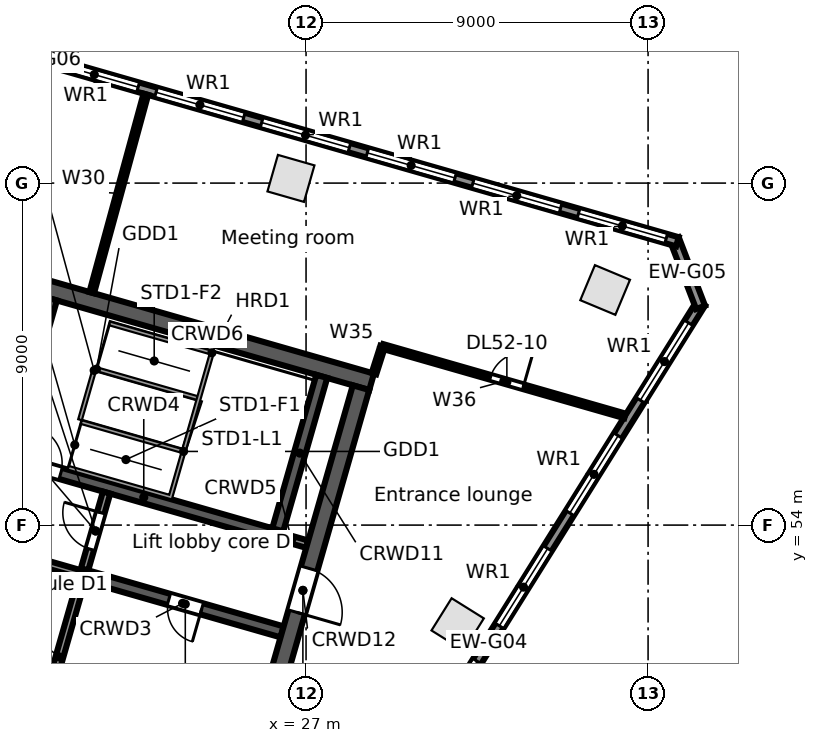
"""IFC4 building model, lengths in metres.
Left out: names, types, materials, properties, quantities, classifications, styles, units other than length and angle.
Written with IfcOpenShell. Run it as: python <this file> out.ifc"""

import sys

from ifc_helpers import new_model, si_unit, direction, frame, frame_2d, origin, origin_2d, place, context, subcontext, project, spatial, rectangle, extrude, element, fill, save


model = new_model("IFC4")
c1 = context("Model", 3, precision=1e-05, world=origin(), true_north=direction((0.0, 1.0)))
c2 = subcontext(c1, "Body", "Model", "MODEL_VIEW")
j1 = project(units=[si_unit("LENGTHUNIT", "METRE"), si_unit("PLANEANGLEUNIT", "RADIAN")], contexts=[c1])
p1 = place(None, origin())
s1 = spatial("IfcSite", under=j1, at=p1, CompositionType="ELEMENT")
p2 = place(p1, origin())
s2 = spatial("IfcBuilding", under=s1, at=p2, CompositionType="ELEMENT")
p3 = place(p2, frame((0.0, 0.0, 238.7)))
s3 = spatial("IfcBuildingStorey", under=s2, at=p3, CompositionType="ELEMENT", Elevation=238.7)
for number, where, z_axis, x_axis in (
    (1, (26.603, 63.124, 0.0), (0.0, 0.0, 1.0), (-0.961, 0.276, 0.0)),
    (2, (30.99, 51.386, 0.0), (0.0, 0.0, 1.0), (0.53, 0.848, 0.0)),
    (3, (34.87, 60.187, 0.0), (0.0, 0.0, 1.0), (-0.923, 0.385, 0.0)),
):
    element("IfcColumn", number, at=place(p3, frame(where, z_axis=z_axis, x_axis=x_axis)), inside=s3, PredefinedType="COLUMN", context=c2, shape_type="SweptSolid", body=[
        extrude(rectangle(XDim=1.0, YDim=1.0, at=origin_2d()), origin(), (0.0, 0.0, 1.0), 3.9),
    ])
p4 = place(p3, frame((37.392, 59.84, 0.0), z_axis=(0.0, 0.0, 1.0), x_axis=(-0.529919909431, -0.848047692992, 0.0)))
e4 = element("IfcWall", 4, at=p4, inside=s3, PredefinedType="STANDARD", context=c2, shape_type="SweptSolid", body=[
    extrude(rectangle(XDim=21.104, YDim=0.25, at=frame_2d((10.552, 0.0))), origin(), (0.0, 0.0, 1.0), 3.62),
])
p5 = place(p4, frame((18.112, 0.0, 0.8)))
e5 = element("IfcOpeningElement", 5, at=p5, cuts=e4, PredefinedType="OPENING", context=c2, shape_type="SweptSolid", body=[
    extrude(rectangle(XDim=2.4, YDim=2.2, at=frame_2d((1.2, 1.1))), frame((0.0, 0.135, 0.0), z_axis=(0.0, -1.0, 0.0), x_axis=(1.0, 0.0, 0.0)), (0.0, 0.0, 1.0), 0.27),
])
p6 = place(p4, frame((14.612, 0.0, 0.8)))
e6 = element("IfcOpeningElement", 6, at=p6, cuts=e4, PredefinedType="OPENING", context=c2, shape_type="SweptSolid", body=[
    extrude(rectangle(XDim=2.4, YDim=2.2, at=frame_2d((1.2, 1.1))), frame((0.0, 0.135, 0.0), z_axis=(0.0, -1.0, 0.0), x_axis=(1.0, 0.0, 0.0)), (0.0, 0.0, 1.0), 0.27),
])
p7 = place(p4, frame((11.112, 0.0, 0.8)))
e7 = element("IfcOpeningElement", 7, at=p7, cuts=e4, PredefinedType="OPENING", context=c2, shape_type="SweptSolid", body=[
    extrude(rectangle(XDim=2.4, YDim=2.2, at=frame_2d((1.2, 1.1))), frame((0.0, 0.135, 0.0), z_axis=(0.0, -1.0, 0.0), x_axis=(1.0, 0.0, 0.0)), (0.0, 0.0, 1.0), 0.27),
])
p8 = place(p4, frame((7.612, 0.0, 0.8)))
e8 = element("IfcOpeningElement", 8, at=p8, cuts=e4, PredefinedType="OPENING", context=c2, shape_type="SweptSolid", body=[
    extrude(rectangle(XDim=2.4, YDim=2.2, at=frame_2d((1.2, 1.1))), frame((0.0, 0.135, 0.0), z_axis=(0.0, -1.0, 0.0), x_axis=(1.0, 0.0, 0.0)), (0.0, 0.0, 1.0), 0.27),
])
p9 = place(p4, frame((4.112, 0.0, 0.8)))
e9 = element("IfcOpeningElement", 9, at=p9, cuts=e4, PredefinedType="OPENING", context=c2, shape_type="SweptSolid", body=[
    extrude(rectangle(XDim=2.4, YDim=2.2, at=frame_2d((1.2, 1.1))), frame((0.0, 0.135, 0.0), z_axis=(0.0, -1.0, 0.0), x_axis=(1.0, 0.0, 0.0)), (0.0, 0.0, 1.0), 0.27),
])
p10 = place(p4, frame((0.612, 0.0, 0.8)))
e10 = element("IfcOpeningElement", 10, at=p10, cuts=e4, PredefinedType="OPENING", context=c2, shape_type="SweptSolid", body=[
    extrude(rectangle(XDim=2.4, YDim=2.2, at=frame_2d((1.2, 1.1))), frame((0.0, 0.135, 0.0), z_axis=(0.0, -1.0, 0.0), x_axis=(1.0, 0.0, 0.0)), (0.0, 0.0, 1.0), 0.27),
])
p11 = place(p3, frame((36.69, 61.531, 0.0), z_axis=(0.0, 0.0, 1.0), x_axis=(0.358377147136, -0.933576895821, 0.0)))
e11 = element("IfcWall", 11, at=p11, inside=s3, PredefinedType="STANDARD", context=c2, shape_type="SweptSolid", body=[
    extrude(rectangle(XDim=1.93, YDim=0.25, at=frame_2d((0.965, 0.0))), origin(), (0.0, 0.0, 1.0), 3.62),
])
p12 = place(p3, frame((3.34, 71.042, 0.0), z_axis=(0.0, 0.0, 1.0), x_axis=(0.96126179431, -0.275637012753, 0.0)))
e12 = element("IfcWall", 12, at=p12, inside=s3, PredefinedType="STANDARD", context=c2, shape_type="SweptSolid", body=[
    extrude(rectangle(XDim=34.779, YDim=0.25, at=frame_2d((17.39, 0.0))), origin(), (0.0, 0.0, 1.0), 3.62),
])
p13 = place(p12, frame((32.071, 0.0, 0.8)))
e13 = element("IfcOpeningElement", 13, at=p13, cuts=e12, PredefinedType="OPENING", context=c2, shape_type="SweptSolid", body=[
    extrude(rectangle(XDim=2.4, YDim=2.2, at=frame_2d((1.2, 1.1))), frame((0.0, 0.135, 0.0), z_axis=(0.0, -1.0, 0.0), x_axis=(1.0, 0.0, 0.0)), (0.0, 0.0, 1.0), 0.27),
])
p14 = place(p12, frame((29.18, 0.0, 0.8)))
e14 = element("IfcOpeningElement", 14, at=p14, cuts=e12, PredefinedType="OPENING", context=c2, shape_type="SweptSolid", body=[
    extrude(rectangle(XDim=2.4, YDim=2.2, at=frame_2d((1.2, 1.1))), frame((0.0, 0.135, 0.0), z_axis=(0.0, -1.0, 0.0), x_axis=(1.0, 0.0, 0.0)), (0.0, 0.0, 1.0), 0.27),
])
p15 = place(p12, frame((26.289, 0.0, 0.8)))
e15 = element("IfcOpeningElement", 15, at=p15, cuts=e12, PredefinedType="OPENING", context=c2, shape_type="SweptSolid", body=[
    extrude(rectangle(XDim=2.4, YDim=2.2, at=frame_2d((1.2, 1.1))), frame((0.0, 0.135, 0.0), z_axis=(0.0, -1.0, 0.0), x_axis=(1.0, 0.0, 0.0)), (0.0, 0.0, 1.0), 0.27),
])
p16 = place(p12, frame((23.398, 0.0, 0.8)))
e16 = element("IfcOpeningElement", 16, at=p16, cuts=e12, PredefinedType="OPENING", context=c2, shape_type="SweptSolid", body=[
    extrude(rectangle(XDim=2.4, YDim=2.2, at=frame_2d((1.2, 1.1))), frame((0.0, 0.135, 0.0), z_axis=(0.0, -1.0, 0.0), x_axis=(1.0, 0.0, 0.0)), (0.0, 0.0, 1.0), 0.27),
])
p17 = place(p12, frame((20.508, 0.0, 0.8)))
e17 = element("IfcOpeningElement", 17, at=p17, cuts=e12, PredefinedType="OPENING", context=c2, shape_type="SweptSolid", body=[
    extrude(rectangle(XDim=2.4, YDim=2.2, at=frame_2d((1.2, 1.1))), frame((0.0, 0.135, 0.0), z_axis=(0.0, -1.0, 0.0), x_axis=(1.0, 0.0, 0.0)), (0.0, 0.0, 1.0), 0.27),
])
p18 = place(p12, frame((17.616, 0.0, 0.8)))
e18 = element("IfcOpeningElement", 18, at=p18, cuts=e12, PredefinedType="OPENING", context=c2, shape_type="SweptSolid", body=[
    extrude(rectangle(XDim=2.4, YDim=2.2, at=frame_2d((1.2, 1.1))), frame((0.0, 0.135, 0.0), z_axis=(0.0, -1.0, 0.0), x_axis=(1.0, 0.0, 0.0)), (0.0, 0.0, 1.0), 0.27),
])
p19 = place(p12, frame((14.726, 0.0, 0.8)))
e19 = element("IfcOpeningElement", 19, at=p19, cuts=e12, PredefinedType="OPENING", context=c2, shape_type="SweptSolid", body=[
    extrude(rectangle(XDim=2.4, YDim=2.2, at=frame_2d((1.2, 1.1))), frame((0.0, 0.135, 0.0), z_axis=(0.0, -1.0, 0.0), x_axis=(1.0, 0.0, 0.0)), (0.0, 0.0, 1.0), 0.27),
])
p20 = place(p12, frame((11.834, 0.0, 0.8)))
e20 = element("IfcOpeningElement", 20, at=p20, cuts=e12, PredefinedType="OPENING", context=c2, shape_type="SweptSolid", body=[
    extrude(rectangle(XDim=2.4, YDim=2.2, at=frame_2d((1.2, 1.1))), frame((0.0, 0.135, 0.0), z_axis=(0.0, -1.0, 0.0), x_axis=(1.0, 0.0, 0.0)), (0.0, 0.0, 1.0), 0.27),
])
p21 = place(p12, frame((8.944, 0.0, 0.8)))
e21 = element("IfcOpeningElement", 21, at=p21, cuts=e12, PredefinedType="OPENING", context=c2, shape_type="SweptSolid", body=[
    extrude(rectangle(XDim=2.4, YDim=2.2, at=frame_2d((1.2, 1.1))), frame((0.0, 0.135, 0.0), z_axis=(0.0, -1.0, 0.0), x_axis=(1.0, 0.0, 0.0)), (0.0, 0.0, 1.0), 0.27),
])
p22 = place(p12, frame((6.052, 0.0, 0.8)))
e22 = element("IfcOpeningElement", 22, at=p22, cuts=e12, PredefinedType="OPENING", context=c2, shape_type="SweptSolid", body=[
    extrude(rectangle(XDim=2.4, YDim=2.2, at=frame_2d((1.2, 1.1))), frame((0.0, 0.135, 0.0), z_axis=(0.0, -1.0, 0.0), x_axis=(1.0, 0.0, 0.0)), (0.0, 0.0, 1.0), 0.27),
])
p23 = place(p12, frame((3.162, 0.0, 0.8)))
e23 = element("IfcOpeningElement", 23, at=p23, cuts=e12, PredefinedType="OPENING", context=c2, shape_type="SweptSolid", body=[
    extrude(rectangle(XDim=2.4, YDim=2.2, at=frame_2d((1.2, 1.1))), frame((0.0, 0.135, 0.0), z_axis=(0.0, -1.0, 0.0), x_axis=(1.0, 0.0, 0.0)), (0.0, 0.0, 1.0), 0.27),
])
p24 = place(p12, frame((0.271, 0.0, 0.8)))
e24 = element("IfcOpeningElement", 24, at=p24, cuts=e12, PredefinedType="OPENING", context=c2, shape_type="SweptSolid", body=[
    extrude(rectangle(XDim=2.4, YDim=2.2, at=frame_2d((1.2, 1.1))), frame((0.0, 0.135, 0.0), z_axis=(0.0, -1.0, 0.0), x_axis=(1.0, 0.0, 0.0)), (0.0, 0.0, 1.0), 0.27),
])
p25 = place(p3, frame((18.583, 53.423, 0.0), z_axis=(0.0, 0.0, 1.0), x_axis=(0.961259287968, -0.275645753268, 0.0)))
e25 = element("IfcWall", 25, at=p25, inside=s3, PredefinedType="SOLIDWALL", context=c2, shape_type="SweptSolid", body=[
    extrude(rectangle(XDim=2.65, YDim=0.2, at=frame_2d((1.325, 0.0))), origin(), (0.0, 0.0, 1.0), 3.62),
])
p26 = place(p3, frame((21.131, 52.692, 0.0), z_axis=(0.0, 0.0, 1.0), x_axis=(0.961261488075, -0.275638080722, 0.0)))
e26 = element("IfcWall", 26, at=p26, inside=s3, PredefinedType="SOLIDWALL", context=c2, shape_type="SweptSolid", body=[
    extrude(rectangle(XDim=5.45, YDim=0.3, at=frame_2d((2.725, 0.0))), origin(), (0.0, 0.0, 1.0), 3.62),
])
p27 = place(p26, frame((2.35, 0.0, 0.0)))
e27 = element("IfcOpeningElement", 27, at=p27, cuts=e26, PredefinedType="OPENING", context=c2, shape_type="SweptSolid", body=[
    extrude(rectangle(XDim=0.9, YDim=2.1, at=frame_2d((0.45, 1.05))), frame((0.0, 0.16, 0.0), z_axis=(0.0, -1.0, 0.0), x_axis=(1.0, 0.0, 0.0)), (0.0, 0.0, 1.0), 0.32),
])
p28 = place(p3, frame((19.245, 55.73, 0.0), z_axis=(0.0, 0.0, 1.0), x_axis=(0.961263007877, -0.275632780503, 0.0)))
e28 = element("IfcWall", 28, at=p28, inside=s3, PredefinedType="SOLIDWALL", context=c2, shape_type="SweptSolid", body=[
    extrude(rectangle(XDim=7.25, YDim=0.3, at=frame_2d((3.625, 0.0))), origin(), (0.0, 0.0, 1.0), 3.62),
])
p29 = place(p28, frame((0.35, 0.0, 0.0)))
e29 = element("IfcOpeningElement", 29, at=p29, cuts=e28, PredefinedType="OPENING", context=c2, shape_type="SweptSolid", body=[
    extrude(rectangle(XDim=1.0, YDim=2.1, at=frame_2d((0.5, 1.05))), frame((0.0, 0.16, 0.0), z_axis=(0.0, -1.0, 0.0), x_axis=(1.0, 0.0, 0.0)), (0.0, 0.0, 1.0), 0.32),
])
p30 = place(p3, frame((26.214, 53.732, 0.0), z_axis=(0.0, 0.0, 1.0), x_axis=(0.961241665642, -0.275707200184, 0.0)))
e30 = element("IfcWall", 30, at=p30, inside=s3, PredefinedType="SOLIDWALL", context=c2, shape_type="SweptSolid", body=[
    extrude(rectangle(XDim=0.85, YDim=0.2, at=frame_2d((0.425, 0.0))), origin(), (0.0, 0.0, 1.0), 3.62),
])
p31 = place(p3, frame((20.073, 60.252, 0.0), z_axis=(0.0, 0.0, 1.0), x_axis=(0.96126248289, -0.275634611374, 0.0)))
e31 = element("IfcWall", 31, at=p31, inside=s3, PredefinedType="SOLIDWALL", context=c2, shape_type="SweptSolid", body=[
    extrude(rectangle(XDim=9.0, YDim=0.45, at=frame_2d((4.5, 0.0))), origin(), (0.0, 0.0, 1.0), 3.62),
])
p32 = place(p3, frame((17.168, 49.303, 0.0), z_axis=(0.0, 0.0, 1.0), x_axis=(0.275638974822, 0.961261231695, 0.0)))
e32 = element("IfcWall", 32, at=p32, inside=s3, PredefinedType="SOLIDWALL", context=c2, shape_type="SweptSolid", body=[
    extrude(rectangle(XDim=11.1, YDim=0.45, at=frame_2d((5.55, 0.0))), origin(), (0.0, 0.0, 1.0), 3.62),
])
p33 = place(p32, frame((4.95, 0.0, 0.0)))
e33 = element("IfcOpeningElement", 33, at=p33, cuts=e32, PredefinedType="OPENING", context=c2, shape_type="SweptSolid", body=[
    extrude(rectangle(XDim=1.2, YDim=2.1, at=frame_2d((0.6, 1.05))), frame((0.0, 0.235, 0.0), z_axis=(0.0, -1.0, 0.0), x_axis=(1.0, 0.0, 0.0)), (0.0, 0.0, 1.0), 0.47),
])
p34 = place(p3, frame((19.932, 48.511, 0.0), z_axis=(0.0, 0.0, 1.0), x_axis=(0.275642273411, 0.961260285827, 0.0)))
e34 = element("IfcWall", 34, at=p34, inside=s3, PredefinedType="SOLIDWALL", context=c2, shape_type="SweptSolid", body=[
    extrude(rectangle(XDim=4.2, YDim=0.2, at=frame_2d((2.1, 0.0))), origin(), (0.0, 0.0, 1.0), 3.62),
])
p35 = place(p3, frame((21.172, 52.837, 0.0), z_axis=(0.0, 0.0, 1.0), x_axis=(0.275657676022, 0.961255868981, 0.0)))
e35 = element("IfcWall", 35, at=p35, inside=s3, PredefinedType="PARTITIONING", context=c2, shape_type="SweptSolid", body=[
    extrude(rectangle(XDim=2.1, YDim=0.2, at=frame_2d((1.05, 0.0))), origin(), (0.0, 0.0, 1.0), 3.62),
])
p36 = place(p35, frame((0.55, 0.0, 0.0)))
e36 = element("IfcOpeningElement", 36, at=p36, cuts=e35, PredefinedType="OPENING", context=c2, shape_type="SweptSolid", body=[
    extrude(rectangle(XDim=1.0, YDim=2.1, at=frame_2d((0.5, 1.05))), frame((0.0, 0.11, 0.0), z_axis=(0.0, -1.0, 0.0), x_axis=(1.0, 0.0, 0.0)), (0.0, 0.0, 1.0), 0.22),
])
p37 = place(p3, frame((26.256, 53.876, 0.0), z_axis=(0.0, 0.0, 1.0), x_axis=(0.275588560745, 0.96127568636, 0.0)))
e37 = element("IfcWall", 37, at=p37, inside=s3, PredefinedType="SOLIDWALL", context=c2, shape_type="SweptSolid", body=[
    extrude(rectangle(XDim=4.2, YDim=0.3, at=frame_2d((2.1, 0.0))), origin(), (0.0, 0.0, 1.0), 3.62),
])
p38 = place(p3, frame((25.387, 46.947, 0.0), z_axis=(0.0, 0.0, 1.0), x_axis=(0.275638974822, 0.961261231695, 0.0)))
e38 = element("IfcWall", 38, at=p38, inside=s3, PredefinedType="SOLIDWALL", context=c2, shape_type="SweptSolid", body=[
    extrude(rectangle(XDim=11.1, YDim=0.45, at=frame_2d((5.55, 0.0))), origin(), (0.0, 0.0, 1.0), 3.62),
])
p39 = place(p38, frame((4.95, 0.0, 0.0)))
e39 = element("IfcOpeningElement", 39, at=p39, cuts=e38, PredefinedType="OPENING", context=c2, shape_type="SweptSolid", body=[
    extrude(rectangle(XDim=1.2, YDim=2.1, at=frame_2d((0.6, 1.05))), frame((0.0, 0.235, 0.0), z_axis=(0.0, -1.0, 0.0), x_axis=(1.0, 0.0, 0.0)), (0.0, 0.0, 1.0), 0.47),
])
p40 = place(p3, frame((21.36, 60.117, 0.0), z_axis=(0.0, 0.0, 1.0), x_axis=(0.263151767798, 0.964754449124, 0.0)))
e40 = element("IfcWall", 40, at=p40, inside=s3, PredefinedType="PARTITIONING", context=c2, shape_type="SweptSolid", body=[
    extrude(rectangle(XDim=5.411, YDim=0.125, at=frame_2d((2.705, 0.0))), origin(), (0.0, 0.0, 1.0), 3.0),
])
p41 = place(p3, frame((28.787, 57.987, 0.0), z_axis=(0.0, 0.0, 1.0), x_axis=(0.305082548948, 0.952325909722, 0.0)))
e41 = element("IfcWall", 41, at=p41, inside=s3, PredefinedType="PARTITIONING", context=c2, shape_type="SweptSolid", body=[
    extrude(rectangle(XDim=0.751, YDim=0.125, at=frame_2d((0.375, 0.0))), origin(), (0.0, 0.0, 1.0), 3.62),
])
p42 = place(p3, frame((29.016, 58.702, 0.0), z_axis=(0.0, 0.0, 1.0), x_axis=(0.961266529031, -0.275620500262, 0.0)))
e42 = element("IfcWall", 42, at=p42, inside=s3, PredefinedType="PARTITIONING", context=c2, shape_type="SweptSolid", body=[
    extrude(rectangle(XDim=6.632, YDim=0.125, at=frame_2d((3.316, 0.0))), origin(), (0.0, 0.0, 1.0), 2.988),
])
p43 = place(p42, frame((2.95, 0.0, 0.0)))
e43 = element("IfcOpeningElement", 43, at=p43, cuts=e42, PredefinedType="OPENING", context=c2, shape_type="SweptSolid", body=[
    extrude(rectangle(XDim=0.9, YDim=2.1, at=frame_2d((0.45, 1.05))), frame((0.0, 0.073, 0.0), z_axis=(0.0, -1.0, 0.0), x_axis=(1.0, 0.0, 0.0)), (0.0, 0.0, 1.0), 0.145),
])
p44 = place(p7, origin())
e44 = element("IfcWindow", 44, at=p44, inside=s3, PartitioningType="SINGLE_PANEL", PredefinedType="WINDOW", context=c2, shape_type="SweptSolid", body=[
    extrude(rectangle(XDim=2.4, YDim=2.2, at=frame_2d((1.2, 1.1))), frame((0.0, 0.03, 0.0), z_axis=(0.0, -1.0, 0.0), x_axis=(1.0, 0.0, 0.0)), (0.0, 0.0, 1.0), 0.06),
])
fill(e7, e44)
p45 = place(p8, origin())
e45 = element("IfcWindow", 45, at=p45, inside=s3, PartitioningType="SINGLE_PANEL", PredefinedType="WINDOW", context=c2, shape_type="SweptSolid", body=[
    extrude(rectangle(XDim=2.4, YDim=2.2, at=frame_2d((1.2, 1.1))), frame((0.0, 0.03, 0.0), z_axis=(0.0, -1.0, 0.0), x_axis=(1.0, 0.0, 0.0)), (0.0, 0.0, 1.0), 0.06),
])
fill(e8, e45)
p46 = place(p9, origin())
e46 = element("IfcWindow", 46, at=p46, inside=s3, PartitioningType="SINGLE_PANEL", PredefinedType="WINDOW", context=c2, shape_type="SweptSolid", body=[
    extrude(rectangle(XDim=2.4, YDim=2.2, at=frame_2d((1.2, 1.1))), frame((0.0, 0.03, 0.0), z_axis=(0.0, -1.0, 0.0), x_axis=(1.0, 0.0, 0.0)), (0.0, 0.0, 1.0), 0.06),
])
fill(e9, e46)
p47 = place(p10, origin())
e47 = element("IfcWindow", 47, at=p47, inside=s3, PartitioningType="SINGLE_PANEL", PredefinedType="WINDOW", context=c2, shape_type="SweptSolid", body=[
    extrude(rectangle(XDim=2.4, YDim=2.2, at=frame_2d((1.2, 1.1))), frame((0.0, 0.03, 0.0), z_axis=(0.0, -1.0, 0.0), x_axis=(1.0, 0.0, 0.0)), (0.0, 0.0, 1.0), 0.06),
])
fill(e10, e47)
p48 = place(p13, origin())
e48 = element("IfcWindow", 48, at=p48, inside=s3, PartitioningType="SINGLE_PANEL", PredefinedType="WINDOW", context=c2, shape_type="SweptSolid", body=[
    extrude(rectangle(XDim=2.4, YDim=2.2, at=frame_2d((1.2, 1.1))), frame((0.0, 0.03, 0.0), z_axis=(0.0, -1.0, 0.0), x_axis=(1.0, 0.0, 0.0)), (0.0, 0.0, 1.0), 0.06),
])
fill(e13, e48)
p49 = place(p14, origin())
e49 = element("IfcWindow", 49, at=p49, inside=s3, PartitioningType="SINGLE_PANEL", PredefinedType="WINDOW", context=c2, shape_type="SweptSolid", body=[
    extrude(rectangle(XDim=2.4, YDim=2.2, at=frame_2d((1.2, 1.1))), frame((0.0, 0.03, 0.0), z_axis=(0.0, -1.0, 0.0), x_axis=(1.0, 0.0, 0.0)), (0.0, 0.0, 1.0), 0.06),
])
fill(e14, e49)
p50 = place(p15, origin())
e50 = element("IfcWindow", 50, at=p50, inside=s3, PartitioningType="SINGLE_PANEL", PredefinedType="WINDOW", context=c2, shape_type="SweptSolid", body=[
    extrude(rectangle(XDim=2.4, YDim=2.2, at=frame_2d((1.2, 1.1))), frame((0.0, 0.03, 0.0), z_axis=(0.0, -1.0, 0.0), x_axis=(1.0, 0.0, 0.0)), (0.0, 0.0, 1.0), 0.06),
])
fill(e15, e50)
p51 = place(p16, origin())
e51 = element("IfcWindow", 51, at=p51, inside=s3, PartitioningType="SINGLE_PANEL", PredefinedType="WINDOW", context=c2, shape_type="SweptSolid", body=[
    extrude(rectangle(XDim=2.4, YDim=2.2, at=frame_2d((1.2, 1.1))), frame((0.0, 0.03, 0.0), z_axis=(0.0, -1.0, 0.0), x_axis=(1.0, 0.0, 0.0)), (0.0, 0.0, 1.0), 0.06),
])
fill(e16, e51)
p52 = place(p17, origin())
e52 = element("IfcWindow", 52, at=p52, inside=s3, PartitioningType="SINGLE_PANEL", PredefinedType="WINDOW", context=c2, shape_type="SweptSolid", body=[
    extrude(rectangle(XDim=2.4, YDim=2.2, at=frame_2d((1.2, 1.1))), frame((0.0, 0.03, 0.0), z_axis=(0.0, -1.0, 0.0), x_axis=(1.0, 0.0, 0.0)), (0.0, 0.0, 1.0), 0.06),
])
fill(e17, e52)
p53 = place(p18, origin())
e53 = element("IfcWindow", 53, at=p53, inside=s3, PartitioningType="SINGLE_PANEL", PredefinedType="WINDOW", context=c2, shape_type="SweptSolid", body=[
    extrude(rectangle(XDim=2.4, YDim=2.2, at=frame_2d((1.2, 1.1))), frame((0.0, 0.03, 0.0), z_axis=(0.0, -1.0, 0.0), x_axis=(1.0, 0.0, 0.0)), (0.0, 0.0, 1.0), 0.06),
])
fill(e18, e53)
p54 = place(p29, origin())
e54 = element("IfcDoor", 54, at=p54, inside=s3, OperationType="SINGLE_SWING_LEFT", PredefinedType="DOOR", context=c2, shape_type="SweptSolid", body=[
    extrude(rectangle(XDim=1.0, YDim=2.1, at=frame_2d((0.5, 1.05))), frame((0.0, 0.025, 0.0), z_axis=(0.0, -1.0, 0.0), x_axis=(1.0, 0.0, 0.0)), (0.0, 0.0, 1.0), 0.05),
])
fill(e29, e54)
p55 = place(p36, origin())
e55 = element("IfcDoor", 55, at=p55, inside=s3, OperationType="SINGLE_SWING_RIGHT", PredefinedType="DOOR", context=c2, shape_type="SweptSolid", body=[
    extrude(rectangle(XDim=1.0, YDim=2.1, at=frame_2d((0.5, 1.05))), frame((0.0, 0.025, 0.0), z_axis=(0.0, -1.0, 0.0), x_axis=(1.0, 0.0, 0.0)), (0.0, 0.0, 1.0), 0.05),
])
fill(e36, e55)
p56 = place(p39, frame((1.2, 0.0, 0.0), z_axis=(0.0, 0.0, 1.0), x_axis=(-1.0, 0.0, 0.0)))
e56 = element("IfcDoor", 56, at=p56, inside=s3, OperationType="SINGLE_SWING_RIGHT", PredefinedType="DOOR", context=c2, shape_type="SweptSolid", body=[
    extrude(rectangle(XDim=1.2, YDim=2.1, at=frame_2d((0.6, 1.05))), frame((0.0, 0.025, 0.0), z_axis=(0.0, -1.0, 0.0), x_axis=(1.0, 0.0, 0.0)), (0.0, 0.0, 1.0), 0.05),
])
fill(e39, e56)
p57 = place(p27, frame((0.9, 0.0, 0.0), z_axis=(0.0, 0.0, 1.0), x_axis=(-1.0, 0.0, 0.0)))
e57 = element("IfcDoor", 57, at=p57, inside=s3, OperationType="SINGLE_SWING_LEFT", PredefinedType="DOOR", context=c2, shape_type="SweptSolid", body=[
    extrude(rectangle(XDim=0.9, YDim=2.1, at=frame_2d((0.45, 1.05))), frame((0.0, 0.025, 0.0), z_axis=(0.0, -1.0, 0.0), x_axis=(1.0, 0.0, 0.0)), (0.0, 0.0, 1.0), 0.05),
])
fill(e27, e57)
p58 = place(p43, origin())
e58 = element("IfcDoor", 58, at=p58, inside=s3, OperationType="SINGLE_SWING_RIGHT", PredefinedType="DOOR", context=c2, shape_type="SweptSolid", body=[
    extrude(rectangle(XDim=0.9, YDim=2.1, at=frame_2d((0.45, 1.05))), frame((0.0, 0.025, 0.0), z_axis=(0.0, -1.0, 0.0), x_axis=(1.0, 0.0, 0.0)), (0.0, 0.0, 1.0), 0.05),
])
fill(e43, e58)
save(model, sys.argv[1])
